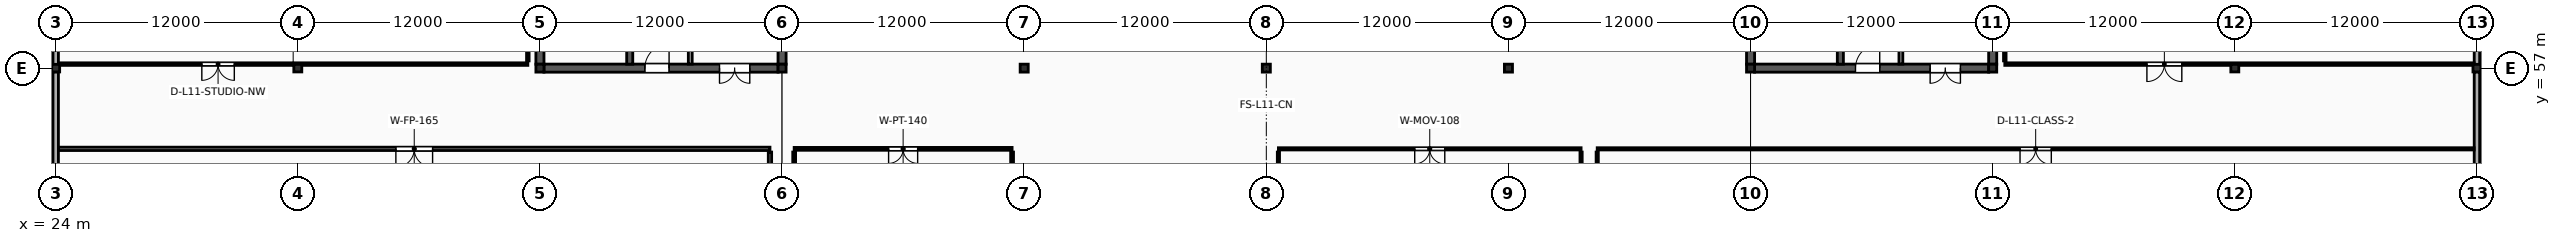
"""IFC4 building model, lengths in metres.
Left out: names, types, materials, properties, quantities, classifications, styles, units other than length and angle.
Written with IfcOpenShell. Run it as: python <this file> out.ifc"""

import sys

from ifc_helpers import new_model, si_unit, direction, frame, frame_2d, origin, origin_2d, place, context, subcontext, project, spatial, rectangle, i_section, extrude, element, fill, save


model = new_model("IFC4")
c1 = context("Model", 3, precision=1e-05, world=origin(), true_north=direction((0.0, 1.0)))
c2 = subcontext(c1, "Body", "Model", "MODEL_VIEW")
j1 = project(units=[si_unit("LENGTHUNIT", "METRE"), si_unit("PLANEANGLEUNIT", "RADIAN")], contexts=[c1])
p1 = place(None, origin())
s1 = spatial("IfcSite", under=j1, at=p1, CompositionType="ELEMENT")
p2 = place(p1, origin())
s2 = spatial("IfcBuilding", under=s1, at=p2, CompositionType="ELEMENT")
p3 = place(p2, frame((0.0, 0.0, 45.6)))
s3 = spatial("IfcBuildingStorey", under=s2, at=p3, CompositionType="ELEMENT", Elevation=45.6)
for number, where, z_axis, x_axis in (
    (1, (24.0, 57.0, 0.0), (0.0, 0.0, 1.0), (1.0, 0.0, 0.0)),
    (2, (36.0, 57.0, 0.0), (0.0, 0.0, 1.0), (1.0, 0.0, 0.0)),
):
    element("IfcColumn", number, at=place(p3, frame(where, z_axis=z_axis, x_axis=x_axis)), inside=s3, PredefinedType="COLUMN", context=c2, shape_type="SweptSolid", body=[
        extrude(i_section(OverallWidth=0.394, OverallDepth=0.375, WebThickness=0.017, FlangeThickness=0.028, FilletRadius=0.018, at=origin_2d()), origin(), (0.0, 0.0, 1.0), 4.0),
    ])
for number, where, z_axis, x_axis in (
    (3, (48.0, 57.0, 0.0), (0.0, 0.0, 1.0), (1.0, 0.0, 0.0)),
    (4, (60.0, 57.0, 0.0), (0.0, 0.0, 1.0), (1.0, 0.0, 0.0)),
    (5, (72.0, 57.0, 0.0), (0.0, 0.0, 1.0), (1.0, 0.0, 0.0)),
    (6, (84.0, 57.0, 0.0), (0.0, 0.0, 1.0), (1.0, 0.0, 0.0)),
    (7, (96.0, 57.0, 0.0), (0.0, 0.0, 1.0), (1.0, 0.0, 0.0)),
    (8, (108.0, 57.0, 0.0), (0.0, 0.0, 1.0), (1.0, 0.0, 0.0)),
    (9, (120.0, 57.0, 0.0), (0.0, 0.0, 1.0), (1.0, 0.0, 0.0)),
):
    element("IfcColumn", number, at=place(p3, frame(where, z_axis=z_axis, x_axis=x_axis)), inside=s3, PredefinedType="COLUMN", context=c2, shape_type="SweptSolid", body=[
        extrude(i_section(OverallWidth=0.399, OverallDepth=0.393, WebThickness=0.023, FlangeThickness=0.037, FilletRadius=0.018, at=origin_2d()), origin(), (0.0, 0.0, 1.0), 4.0),
    ])
for number, where, z_axis, x_axis in (
    (10, (132.0, 57.0, 0.0), (0.0, 0.0, 1.0), (1.0, 0.0, 0.0)),
    (11, (144.0, 57.0, 0.0), (0.0, 0.0, 1.0), (1.0, 0.0, 0.0)),
):
    element("IfcColumn", number, at=place(p3, frame(where, z_axis=z_axis, x_axis=x_axis)), inside=s3, PredefinedType="COLUMN", context=c2, shape_type="SweptSolid", body=[
        extrude(i_section(OverallWidth=0.394, OverallDepth=0.375, WebThickness=0.017, FlangeThickness=0.028, FilletRadius=0.018, at=origin_2d()), origin(), (0.0, 0.0, 1.0), 4.0),
    ])
p4 = place(p3, frame((48.197, 57.0, 0.0), z_axis=(0.0, 0.0, 1.0), x_axis=(1.0, 0.0, 0.0)))
e12 = element("IfcWall", 12, at=p4, inside=s3, PredefinedType="SHEAR", context=c2, shape_type="SweptSolid", body=[
    extrude(rectangle(XDim=11.607, YDim=0.4, at=frame_2d((5.803, 0.0))), origin(), (0.0, 0.0, 1.0), 3.843),
])
p5 = place(p4, frame((5.004, 0.0, 0.0)))
e13 = element("IfcOpeningElement", 13, at=p5, cuts=e12, PredefinedType="OPENING", context=c2, shape_type="SweptSolid", body=[
    extrude(rectangle(XDim=1.2, YDim=2.2, at=frame_2d((0.6, 1.1))), frame((0.0, 0.215, 0.0), z_axis=(0.0, -1.0, 0.0), x_axis=(1.0, 0.0, 0.0)), (0.0, 0.0, 1.0), 0.43),
])
p6 = place(p4, frame((8.703, 0.0, 0.0)))
e14 = element("IfcOpeningElement", 14, at=p6, cuts=e12, PredefinedType="OPENING", context=c2, shape_type="SweptSolid", body=[
    extrude(rectangle(XDim=1.5, YDim=2.25, at=frame_2d((0.75, 1.125))), frame((0.0, 0.215, 0.0), z_axis=(0.0, -1.0, 0.0), x_axis=(1.0, 0.0, 0.0)), (0.0, 0.0, 1.0), 0.43),
])
for number, where, z_axis, x_axis in (
    (15, (48.0, 57.194, 0.0), (0.0, 0.0, 1.0), (0.0, 1.0, 0.0)),
    (16, (60.0, 57.194, 0.0), (0.0, 0.0, 1.0), (0.0, 1.0, 0.0)),
):
    element("IfcWall", number, at=place(p3, frame(where, z_axis=z_axis, x_axis=x_axis)), inside=s3, PredefinedType="SHEAR", context=c2, shape_type="SweptSolid", body=[
        extrude(rectangle(XDim=11.613, YDim=0.4, at=frame_2d((5.806, 0.0))), origin(), (0.0, 0.0, 1.0), 3.843),
    ])
p7 = place(p3, frame((52.45, 57.197, 0.0), z_axis=(0.0, 0.0, 1.0), x_axis=(0.0, 1.0, 0.0)))
e17 = element("IfcWall", 17, at=p7, inside=s3, PredefinedType="SHEAR", context=c2, shape_type="SweptSolid", body=[
    extrude(rectangle(XDim=11.606, YDim=0.3, at=frame_2d((5.803, 0.0))), origin(), (0.0, 0.0, 1.0), 3.843),
])
p8 = place(p7, frame((0.9, 0.0, 0.0)))
e18 = element("IfcOpeningElement", 18, at=p8, cuts=e17, PredefinedType="OPENING", context=c2, shape_type="SweptSolid", body=[
    extrude(rectangle(XDim=1.1, YDim=2.2, at=frame_2d((0.55, 1.1))), frame((0.0, 0.165, 0.0), z_axis=(0.0, -1.0, 0.0), x_axis=(1.0, 0.0, 0.0)), (0.0, 0.0, 1.0), 0.33),
])
p9 = place(p3, frame((55.45, 57.2, 0.0), z_axis=(0.0, 0.0, 1.0), x_axis=(0.0, 1.0, 0.0)))
e19 = element("IfcWall", 19, at=p9, inside=s3, PredefinedType="SOLIDWALL", context=c2, shape_type="SweptSolid", body=[
    extrude(rectangle(XDim=8.48, YDim=0.19, at=frame_2d((4.24, 0.0))), origin(), (0.0, 0.0, 1.0), 3.833),
])
p10 = place(p9, frame((3.6, 0.0, 0.0)))
e20 = element("IfcOpeningElement", 20, at=p10, cuts=e19, PredefinedType="OPENING", context=c2, shape_type="SweptSolid", body=[
    extrude(rectangle(XDim=1.04, YDim=2.18, at=frame_2d((0.52, 1.09))), frame((0.0, 0.11, 0.0), z_axis=(0.0, -1.0, 0.0), x_axis=(1.0, 0.0, 0.0)), (0.0, 0.0, 1.0), 0.22),
])
p11 = place(p3, frame((108.197, 57.0, 0.0), z_axis=(0.0, 0.0, 1.0), x_axis=(1.0, 0.0, 0.0)))
e21 = element("IfcWall", 21, at=p11, inside=s3, PredefinedType="SHEAR", context=c2, shape_type="SweptSolid", body=[
    extrude(rectangle(XDim=11.607, YDim=0.4, at=frame_2d((5.803, 0.0))), origin(), (0.0, 0.0, 1.0), 3.843),
])
p12 = place(p11, frame((5.004, 0.0, 0.0)))
e22 = element("IfcOpeningElement", 22, at=p12, cuts=e21, PredefinedType="OPENING", context=c2, shape_type="SweptSolid", body=[
    extrude(rectangle(XDim=1.2, YDim=2.2, at=frame_2d((0.6, 1.1))), frame((0.0, 0.215, 0.0), z_axis=(0.0, -1.0, 0.0), x_axis=(1.0, 0.0, 0.0)), (0.0, 0.0, 1.0), 0.43),
])
p13 = place(p11, frame((8.704, 0.0, 0.0)))
e23 = element("IfcOpeningElement", 23, at=p13, cuts=e21, PredefinedType="OPENING", context=c2, shape_type="SweptSolid", body=[
    extrude(rectangle(XDim=1.5, YDim=2.25, at=frame_2d((0.75, 1.125))), frame((0.0, 0.215, 0.0), z_axis=(0.0, -1.0, 0.0), x_axis=(1.0, 0.0, 0.0)), (0.0, 0.0, 1.0), 0.43),
])
for number, where, z_axis, x_axis in (
    (24, (108.0, 57.194, 0.0), (0.0, 0.0, 1.0), (0.0, 1.0, 0.0)),
    (25, (120.0, 57.194, 0.0), (0.0, 0.0, 1.0), (0.0, 1.0, 0.0)),
):
    element("IfcWall", number, at=place(p3, frame(where, z_axis=z_axis, x_axis=x_axis)), inside=s3, PredefinedType="SHEAR", context=c2, shape_type="SweptSolid", body=[
        extrude(rectangle(XDim=11.613, YDim=0.4, at=frame_2d((5.806, 0.0))), origin(), (0.0, 0.0, 1.0), 3.843),
    ])
p14 = place(p3, frame((112.45, 57.197, 0.0), z_axis=(0.0, 0.0, 1.0), x_axis=(0.0, 1.0, 0.0)))
e26 = element("IfcWall", 26, at=p14, inside=s3, PredefinedType="SHEAR", context=c2, shape_type="SweptSolid", body=[
    extrude(rectangle(XDim=11.606, YDim=0.3, at=frame_2d((5.803, 0.0))), origin(), (0.0, 0.0, 1.0), 3.843),
])
p15 = place(p14, frame((0.9, 0.0, 0.0)))
e27 = element("IfcOpeningElement", 27, at=p15, cuts=e26, PredefinedType="OPENING", context=c2, shape_type="SweptSolid", body=[
    extrude(rectangle(XDim=1.1, YDim=2.2, at=frame_2d((0.55, 1.1))), frame((0.0, 0.165, 0.0), z_axis=(0.0, -1.0, 0.0), x_axis=(1.0, 0.0, 0.0)), (0.0, 0.0, 1.0), 0.33),
])
p16 = place(p3, frame((115.45, 57.2, 0.0), z_axis=(0.0, 0.0, 1.0), x_axis=(0.0, 1.0, 0.0)))
e28 = element("IfcWall", 28, at=p16, inside=s3, PredefinedType="SOLIDWALL", context=c2, shape_type="SweptSolid", body=[
    extrude(rectangle(XDim=8.48, YDim=0.19, at=frame_2d((4.24, 0.0))), origin(), (0.0, 0.0, 1.0), 3.833),
])
p17 = place(p16, frame((3.6, 0.0, 0.0)))
e29 = element("IfcOpeningElement", 29, at=p17, cuts=e28, PredefinedType="OPENING", context=c2, shape_type="SweptSolid", body=[
    extrude(rectangle(XDim=1.04, YDim=2.18, at=frame_2d((0.52, 1.09))), frame((0.0, 0.11, 0.0), z_axis=(0.0, -1.0, 0.0), x_axis=(1.0, 0.0, 0.0)), (0.0, 0.0, 1.0), 0.22),
])
p18 = place(p3, frame((24.0, 45.186, 0.0), z_axis=(0.0, 0.0, 1.0), x_axis=(0.0, 1.0, 0.0)))
e30 = element("IfcWall", 30, at=p18, inside=s3, PredefinedType="SOLIDWALL", context=c2, shape_type="SweptSolid", body=[
    extrude(rectangle(XDim=11.629, YDim=0.27, at=frame_2d((5.814, 0.0))), origin(), (0.0, 0.0, 1.0), 3.236),
])
p19 = place(p18, frame((5.014, 0.0, 0.78)))
e31 = element("IfcOpeningElement", 31, at=p19, cuts=e30, PredefinedType="OPENING", context=c2, shape_type="SweptSolid", body=[
    extrude(rectangle(XDim=1.6, YDim=1.25, at=frame_2d((0.8, 0.625))), frame((0.0, 0.15, 0.0), z_axis=(0.0, -1.0, 0.0), x_axis=(1.0, 0.0, 0.0)), (0.0, 0.0, 1.0), 0.3),
])
p20 = place(p3, frame((24.0, 57.186, 0.0), z_axis=(0.0, 0.0, 1.0), x_axis=(0.0, 1.0, 0.0)))
e32 = element("IfcWall", 32, at=p20, inside=s3, PredefinedType="SOLIDWALL", context=c2, shape_type="SweptSolid", body=[
    extrude(rectangle(XDim=11.629, YDim=0.27, at=frame_2d((5.814, 0.0))), origin(), (0.0, 0.0, 1.0), 3.236),
])
p21 = place(p20, frame((4.939, 0.0, 0.78)))
e33 = element("IfcOpeningElement", 33, at=p21, cuts=e32, PredefinedType="OPENING", context=c2, shape_type="SweptSolid", body=[
    extrude(rectangle(XDim=1.75, YDim=1.25, at=frame_2d((0.875, 0.625))), frame((0.0, 0.15, 0.0), z_axis=(0.0, -1.0, 0.0), x_axis=(1.0, 0.0, 0.0)), (0.0, 0.0, 1.0), 0.3),
])
p22 = place(p3, frame((144.0, 45.186, 0.0), z_axis=(0.0, 0.0, 1.0), x_axis=(0.0, 1.0, 0.0)))
e34 = element("IfcWall", 34, at=p22, inside=s3, PredefinedType="SOLIDWALL", context=c2, shape_type="SweptSolid", body=[
    extrude(rectangle(XDim=11.629, YDim=0.27, at=frame_2d((5.814, 0.0))), origin(), (0.0, 0.0, 1.0), 3.236),
])
p23 = place(p22, frame((4.79, 0.0, 0.78)))
e35 = element("IfcOpeningElement", 35, at=p23, cuts=e34, PredefinedType="OPENING", context=c2, shape_type="SweptSolid", body=[
    extrude(rectangle(XDim=2.05, YDim=1.25, at=frame_2d((1.025, 0.625))), frame((0.0, 0.15, 0.0), z_axis=(0.0, -1.0, 0.0), x_axis=(1.0, 0.0, 0.0)), (0.0, 0.0, 1.0), 0.3),
])
p24 = place(p3, frame((144.0, 57.186, 0.0), z_axis=(0.0, 0.0, 1.0), x_axis=(0.0, 1.0, 0.0)))
e36 = element("IfcWall", 36, at=p24, inside=s3, PredefinedType="SOLIDWALL", context=c2, shape_type="SweptSolid", body=[
    extrude(rectangle(XDim=11.629, YDim=0.27, at=frame_2d((5.814, 0.0))), origin(), (0.0, 0.0, 1.0), 3.236),
])
p25 = place(p24, frame((4.714, 0.0, 0.78)))
e37 = element("IfcOpeningElement", 37, at=p25, cuts=e36, PredefinedType="OPENING", context=c2, shape_type="SweptSolid", body=[
    extrude(rectangle(XDim=2.2, YDim=1.25, at=frame_2d((1.1, 0.625))), frame((0.0, 0.15, 0.0), z_axis=(0.0, -1.0, 0.0), x_axis=(1.0, 0.0, 0.0)), (0.0, 0.0, 1.0), 0.3),
])
p26 = place(p3, frame((24.14, 53.0, 0.0), z_axis=(0.0, 0.0, 1.0), x_axis=(1.0, 0.0, 0.0)))
e38 = element("IfcWall", 38, at=p26, inside=s3, PredefinedType="PARTITIONING", context=c2, shape_type="SweptSolid", body=[
    extrude(rectangle(XDim=35.26, YDim=0.165, at=frame_2d((17.63, 0.0))), origin(), (0.0, 0.0, 1.0), 2.88),
])
p27 = place(p26, frame((16.72, 0.0, 0.0)))
e39 = element("IfcOpeningElement", 39, at=p27, cuts=e38, PredefinedType="OPENING", context=c2, shape_type="SweptSolid", body=[
    extrude(rectangle(XDim=1.82, YDim=2.36, at=frame_2d((0.91, 1.18))), frame((0.0, 0.097, 0.0), z_axis=(0.0, -1.0, 0.0), x_axis=(1.0, 0.0, 0.0)), (0.0, 0.0, 1.0), 0.195),
])
p28 = place(p3, frame((59.4, 27.14, 0.0), z_axis=(0.0, 0.0, 1.0), x_axis=(0.0, 1.0, 0.0)))
e40 = element("IfcWall", 40, at=p28, inside=s3, PredefinedType="PARTITIONING", context=c2, shape_type="SweptSolid", body=[
    extrude(rectangle(XDim=25.7, YDim=0.165, at=frame_2d((12.85, 0.0))), origin(), (0.0, 0.0, 1.0), 2.88),
])
p29 = place(p3, frame((60.6, 53.0, 0.0), z_axis=(0.0, 0.0, 1.0), x_axis=(1.0, 0.0, 0.0)))
e41 = element("IfcWall", 41, at=p29, inside=s3, PredefinedType="PARTITIONING", context=c2, shape_type="SweptSolid", body=[
    extrude(rectangle(XDim=10.8, YDim=0.14, at=frame_2d((5.4, 0.0))), origin(), (0.0, 0.0, 1.0), 2.88),
])
p30 = place(p29, frame((4.68, 0.0, 0.0)))
e42 = element("IfcOpeningElement", 42, at=p30, cuts=e41, PredefinedType="OPENING", context=c2, shape_type="SweptSolid", body=[
    extrude(rectangle(XDim=1.44, YDim=2.26, at=frame_2d((0.72, 1.13))), frame((0.0, 0.085, 0.0), z_axis=(0.0, -1.0, 0.0), x_axis=(1.0, 0.0, 0.0)), (0.0, 0.0, 1.0), 0.17),
])
for number, where, z_axis, x_axis in (
    (43, (60.6, 27.14, 0.0), (0.0, 0.0, 1.0), (0.0, 1.0, 0.0)),
    (44, (71.4, 27.14, 0.0), (0.0, 0.0, 1.0), (0.0, 1.0, 0.0)),
):
    element("IfcWall", number, at=place(p3, frame(where, z_axis=z_axis, x_axis=x_axis)), inside=s3, PredefinedType="PARTITIONING", context=c2, shape_type="SweptSolid", body=[
        extrude(rectangle(XDim=25.7, YDim=0.14, at=frame_2d((12.85, 0.0))), origin(), (0.0, 0.0, 1.0), 2.88),
    ])
p31 = place(p3, frame((84.6, 53.0, 0.0), z_axis=(0.0, 0.0, 1.0), x_axis=(1.0, 0.0, 0.0)))
e45 = element("IfcWall", 45, at=p31, inside=s3, PredefinedType="MOVABLE", context=c2, shape_type="SweptSolid", body=[
    extrude(rectangle(XDim=15.0, YDim=0.108, at=frame_2d((7.5, 0.0))), origin(), (0.0, 0.0, 1.0), 2.88),
])
p32 = place(p31, frame((6.755, 0.0, 0.0)))
e46 = element("IfcOpeningElement", 46, at=p32, cuts=e45, PredefinedType="OPENING", context=c2, shape_type="SweptSolid", body=[
    extrude(rectangle(XDim=1.49, YDim=2.28, at=frame_2d((0.745, 1.14))), frame((0.0, 0.069, 0.0), z_axis=(0.0, -1.0, 0.0), x_axis=(1.0, 0.0, 0.0)), (0.0, 0.0, 1.0), 0.138),
])
for number, where, z_axis, x_axis in (
    (47, (84.6, 27.14, 0.0), (0.0, 0.0, 1.0), (0.0, 1.0, 0.0)),
    (48, (99.6, 27.14, 0.0), (0.0, 0.0, 1.0), (0.0, 1.0, 0.0)),
):
    element("IfcWall", number, at=place(p3, frame(where, z_axis=z_axis, x_axis=x_axis)), inside=s3, PredefinedType="MOVABLE", context=c2, shape_type="SweptSolid", body=[
        extrude(rectangle(XDim=25.7, YDim=0.108, at=frame_2d((12.85, 0.0))), origin(), (0.0, 0.0, 1.0), 2.88),
    ])
p33 = place(p3, frame((100.4, 53.0, 0.0), z_axis=(0.0, 0.0, 1.0), x_axis=(1.0, 0.0, 0.0)))
e49 = element("IfcWall", 49, at=p33, inside=s3, PredefinedType="MOVABLE", context=c2, shape_type="SweptSolid", body=[
    extrude(rectangle(XDim=43.46, YDim=0.108, at=frame_2d((21.73, 0.0))), origin(), (0.0, 0.0, 1.0), 2.88),
])
p34 = place(p33, frame((20.955, 0.0, 0.0)))
e50 = element("IfcOpeningElement", 50, at=p34, cuts=e49, PredefinedType="OPENING", context=c2, shape_type="SweptSolid", body=[
    extrude(rectangle(XDim=1.55, YDim=2.31, at=frame_2d((0.775, 1.155))), frame((0.0, 0.069, 0.0), z_axis=(0.0, -1.0, 0.0), x_axis=(1.0, 0.0, 0.0)), (0.0, 0.0, 1.0), 0.138),
])
p35 = place(p3, frame((100.4, 27.14, 0.0), z_axis=(0.0, 0.0, 1.0), x_axis=(0.0, 1.0, 0.0)))
e51 = element("IfcWall", 51, at=p35, inside=s3, PredefinedType="MOVABLE", context=c2, shape_type="SweptSolid", body=[
    extrude(rectangle(XDim=25.7, YDim=0.108, at=frame_2d((12.85, 0.0))), origin(), (0.0, 0.0, 1.0), 2.88),
])
p36 = place(p3, frame((24.14, 57.2, 0.0), z_axis=(0.0, 0.0, 1.0), x_axis=(1.0, 0.0, 0.0)))
e52 = element("IfcWall", 52, at=p36, inside=s3, PredefinedType="PARTITIONING", context=c2, shape_type="SweptSolid", body=[
    extrude(rectangle(XDim=23.26, YDim=0.125, at=frame_2d((11.63, 0.0))), origin(), (0.0, 0.0, 1.0), 2.88),
])
p37 = place(p36, frame((7.103, 0.0, 0.0)))
e53 = element("IfcOpeningElement", 53, at=p37, cuts=e52, PredefinedType="OPENING", context=c2, shape_type="SweptSolid", body=[
    extrude(rectangle(XDim=1.61, YDim=2.33, at=frame_2d((0.805, 1.165))), frame((0.0, 0.077, 0.0), z_axis=(0.0, -1.0, 0.0), x_axis=(1.0, 0.0, 0.0)), (0.0, 0.0, 1.0), 0.155),
])
p38 = place(p3, frame((47.4, 57.36, 0.0), z_axis=(0.0, 0.0, 1.0), x_axis=(0.0, 1.0, 0.0)))
e54 = element("IfcWall", 54, at=p38, inside=s3, PredefinedType="PARTITIONING", context=c2, shape_type="SweptSolid", body=[
    extrude(rectangle(XDim=11.5, YDim=0.125, at=frame_2d((5.75, 0.0))), origin(), (0.0, 0.0, 1.0), 2.88),
])
p39 = place(p3, frame((120.6, 57.2, 0.0), z_axis=(0.0, 0.0, 1.0), x_axis=(1.0, 0.0, 0.0)))
e55 = element("IfcWall", 55, at=p39, inside=s3, PredefinedType="PARTITIONING", context=c2, shape_type="SweptSolid", body=[
    extrude(rectangle(XDim=23.26, YDim=0.125, at=frame_2d((11.63, 0.0))), origin(), (0.0, 0.0, 1.0), 2.88),
])
p40 = place(p39, frame((7.043, 0.0, 0.0)))
e56 = element("IfcOpeningElement", 56, at=p40, cuts=e55, PredefinedType="OPENING", context=c2, shape_type="SweptSolid", body=[
    extrude(rectangle(XDim=1.73, YDim=2.37, at=frame_2d((0.865, 1.185))), frame((0.0, 0.077, 0.0), z_axis=(0.0, -1.0, 0.0), x_axis=(1.0, 0.0, 0.0)), (0.0, 0.0, 1.0), 0.155),
])
p41 = place(p3, frame((120.6, 57.36, 0.0), z_axis=(0.0, 0.0, 1.0), x_axis=(0.0, 1.0, 0.0)))
e57 = element("IfcWall", 57, at=p41, inside=s3, PredefinedType="PARTITIONING", context=c2, shape_type="SweptSolid", body=[
    extrude(rectangle(XDim=11.5, YDim=0.125, at=frame_2d((5.75, 0.0))), origin(), (0.0, 0.0, 1.0), 2.88),
])
p42 = place(p5, origin())
e58 = element("IfcDoor", 58, at=p42, inside=s3, OperationType="SINGLE_SWING_RIGHT", PredefinedType="DOOR", context=c2, shape_type="SweptSolid", body=[
    extrude(rectangle(XDim=1.2, YDim=2.2, at=frame_2d((0.6, 1.1))), frame((0.0, 0.025, 0.0), z_axis=(0.0, -1.0, 0.0), x_axis=(1.0, 0.0, 0.0)), (0.0, 0.0, 1.0), 0.05),
])
fill(e13, e58)
p43 = place(p6, origin())
e59 = element("IfcDoor", 59, at=p43, inside=s3, OperationType="DOUBLE_DOOR_SINGLE_SWING", PredefinedType="DOOR", context=c2, shape_type="SweptSolid", body=[
    extrude(rectangle(XDim=1.5, YDim=2.25, at=frame_2d((0.75, 1.125))), frame((0.0, 0.025, 0.0), z_axis=(0.0, -1.0, 0.0), x_axis=(1.0, 0.0, 0.0)), (0.0, 0.0, 1.0), 0.05),
])
fill(e14, e59)
p44 = place(p12, origin())
e60 = element("IfcDoor", 60, at=p44, inside=s3, OperationType="SINGLE_SWING_RIGHT", PredefinedType="DOOR", context=c2, shape_type="SweptSolid", body=[
    extrude(rectangle(XDim=1.2, YDim=2.2, at=frame_2d((0.6, 1.1))), frame((0.0, 0.025, 0.0), z_axis=(0.0, -1.0, 0.0), x_axis=(1.0, 0.0, 0.0)), (0.0, 0.0, 1.0), 0.05),
])
fill(e22, e60)
p45 = place(p13, origin())
e61 = element("IfcDoor", 61, at=p45, inside=s3, OperationType="DOUBLE_DOOR_SINGLE_SWING", PredefinedType="DOOR", context=c2, shape_type="SweptSolid", body=[
    extrude(rectangle(XDim=1.5, YDim=2.25, at=frame_2d((0.75, 1.125))), frame((0.0, 0.025, 0.0), z_axis=(0.0, -1.0, 0.0), x_axis=(1.0, 0.0, 0.0)), (0.0, 0.0, 1.0), 0.05),
])
fill(e23, e61)
p46 = place(p27, origin())
e62 = element("IfcDoor", 62, at=p46, inside=s3, OperationType="DOUBLE_DOOR_SINGLE_SWING", PredefinedType="DOOR", context=c2, shape_type="SweptSolid", body=[
    extrude(rectangle(XDim=1.82, YDim=2.36, at=frame_2d((0.91, 1.18))), frame((0.0, 0.025, 0.0), z_axis=(0.0, -1.0, 0.0), x_axis=(1.0, 0.0, 0.0)), (0.0, 0.0, 1.0), 0.05),
])
fill(e39, e62)
p47 = place(p30, origin())
e63 = element("IfcDoor", 63, at=p47, inside=s3, OperationType="DOUBLE_DOOR_SINGLE_SWING", PredefinedType="DOOR", context=c2, shape_type="SweptSolid", body=[
    extrude(rectangle(XDim=1.44, YDim=2.26, at=frame_2d((0.72, 1.13))), frame((0.0, 0.025, 0.0), z_axis=(0.0, -1.0, 0.0), x_axis=(1.0, 0.0, 0.0)), (0.0, 0.0, 1.0), 0.05),
])
fill(e42, e63)
p48 = place(p32, origin())
e64 = element("IfcDoor", 64, at=p48, inside=s3, OperationType="DOUBLE_DOOR_SINGLE_SWING", PredefinedType="DOOR", context=c2, shape_type="SweptSolid", body=[
    extrude(rectangle(XDim=1.49, YDim=2.28, at=frame_2d((0.745, 1.14))), frame((0.0, 0.025, 0.0), z_axis=(0.0, -1.0, 0.0), x_axis=(1.0, 0.0, 0.0)), (0.0, 0.0, 1.0), 0.05),
])
fill(e46, e64)
p49 = place(p34, origin())
e65 = element("IfcDoor", 65, at=p49, inside=s3, OperationType="DOUBLE_DOOR_SINGLE_SWING", PredefinedType="DOOR", context=c2, shape_type="SweptSolid", body=[
    extrude(rectangle(XDim=1.55, YDim=2.31, at=frame_2d((0.775, 1.155))), frame((0.0, 0.025, 0.0), z_axis=(0.0, -1.0, 0.0), x_axis=(1.0, 0.0, 0.0)), (0.0, 0.0, 1.0), 0.05),
])
fill(e50, e65)
p50 = place(p37, origin())
e66 = element("IfcDoor", 66, at=p50, inside=s3, OperationType="DOUBLE_DOOR_SINGLE_SWING", PredefinedType="DOOR", context=c2, shape_type="SweptSolid", body=[
    extrude(rectangle(XDim=1.61, YDim=2.33, at=frame_2d((0.805, 1.165))), frame((0.0, 0.025, 0.0), z_axis=(0.0, -1.0, 0.0), x_axis=(1.0, 0.0, 0.0)), (0.0, 0.0, 1.0), 0.05),
])
fill(e53, e66)
p51 = place(p40, origin())
e67 = element("IfcDoor", 67, at=p51, inside=s3, OperationType="DOUBLE_DOOR_SINGLE_SWING", PredefinedType="DOOR", context=c2, shape_type="SweptSolid", body=[
    extrude(rectangle(XDim=1.73, YDim=2.37, at=frame_2d((0.865, 1.185))), frame((0.0, 0.025, 0.0), z_axis=(0.0, -1.0, 0.0), x_axis=(1.0, 0.0, 0.0)), (0.0, 0.0, 1.0), 0.05),
])
fill(e56, e67)
save(model, sys.argv[1])
